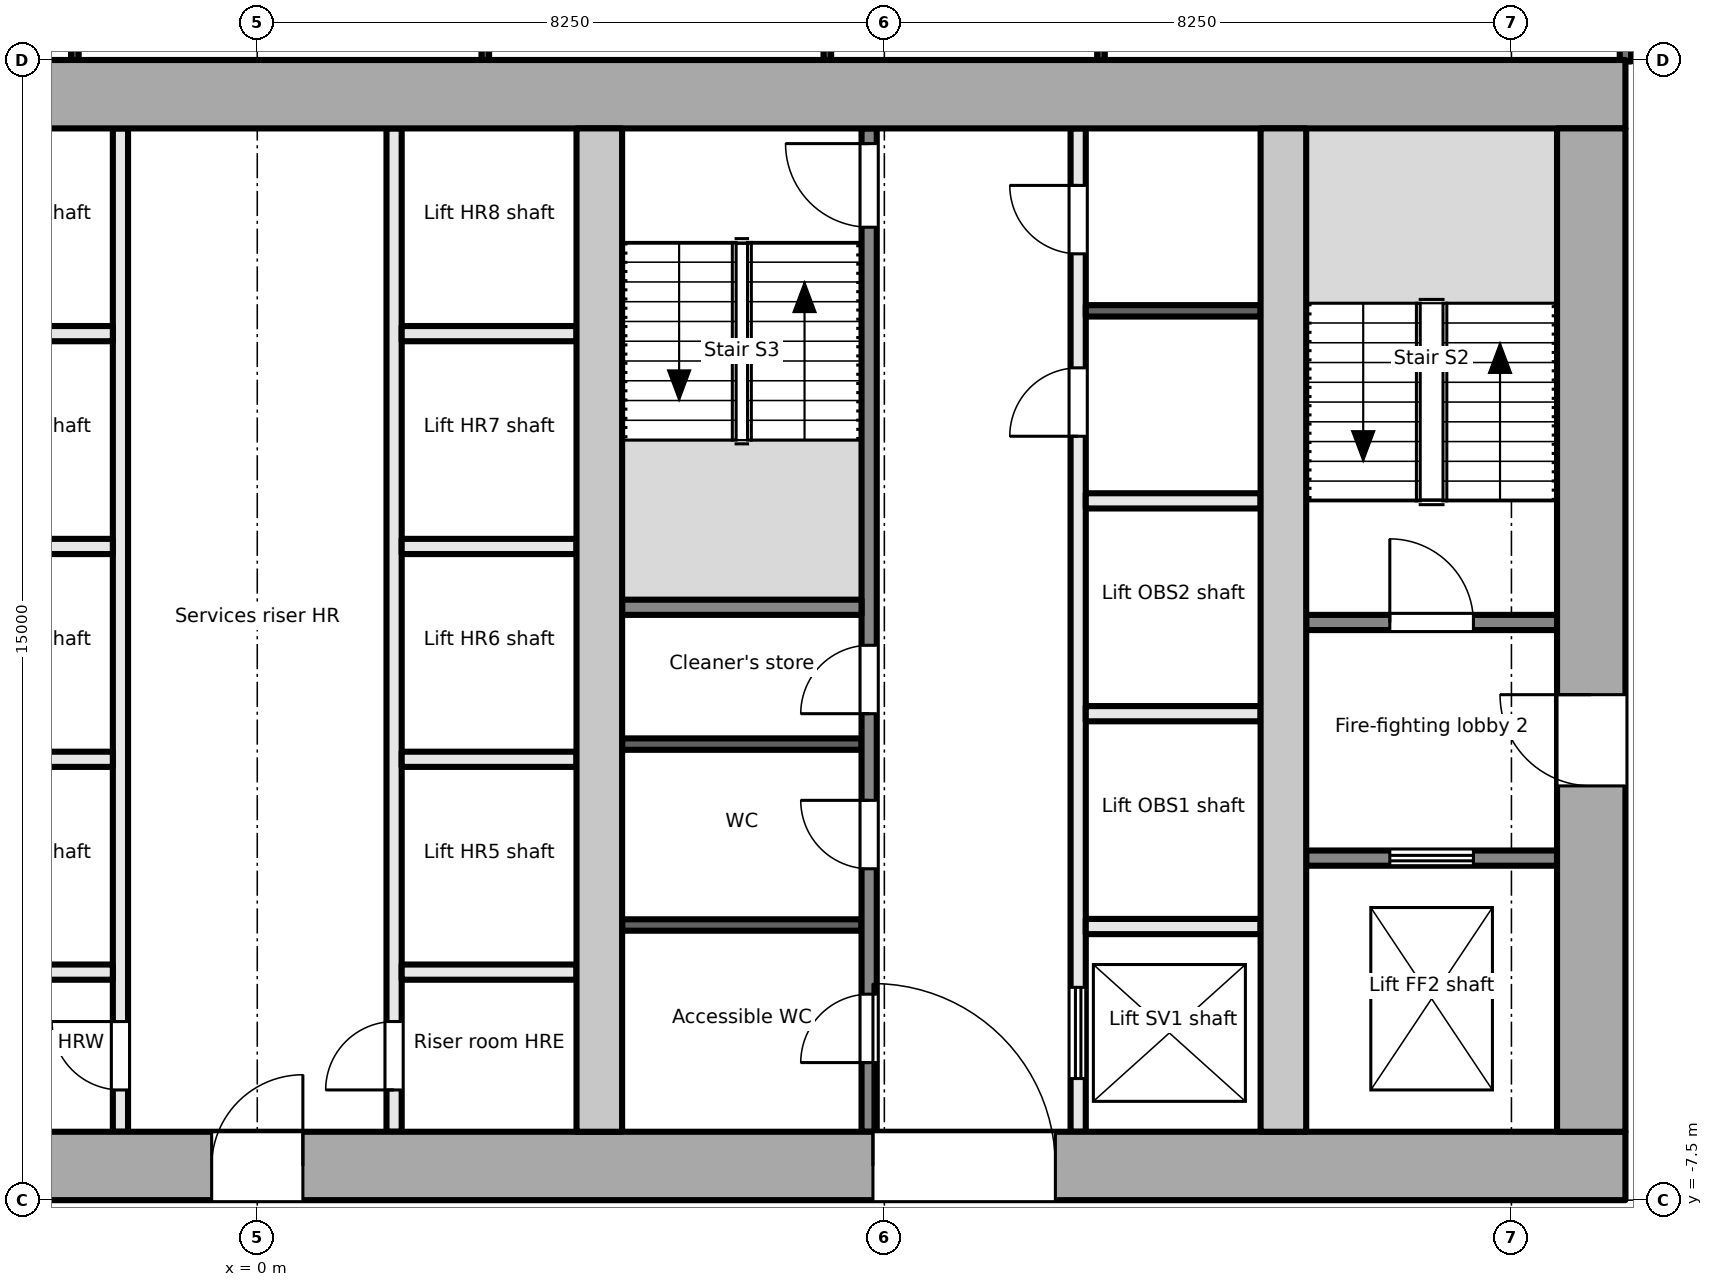
"""IFC4 building model, lengths in metres.
Left out: names, types, materials, properties, quantities, classifications, styles, units other than length and angle.
Written with IfcOpenShell. Run it as: python <this file> out.ifc"""

import sys

from ifc_helpers import new_model, si_unit, direction, frame, frame_2d, origin, place, context, subcontext, project, spatial, rectangle, extrude, element, fill, save


model = new_model("IFC4")
c1 = context("Model", 3, precision=1e-05, world=origin(), true_north=direction((0.0, 1.0)))
c2 = subcontext(c1, "Body", "Model", "MODEL_VIEW")
j1 = project(units=[si_unit("LENGTHUNIT", "METRE"), si_unit("PLANEANGLEUNIT", "RADIAN")], contexts=[c1])
p1 = place(None, origin())
s1 = spatial("IfcSite", under=j1, at=p1, CompositionType="ELEMENT")
p2 = place(p1, origin())
s2 = spatial("IfcBuilding", under=s1, at=p2, CompositionType="ELEMENT")
p3 = place(p2, frame((0.0, 0.0, 146.1)))
s3 = spatial("IfcBuildingStorey", under=s2, at=p3, CompositionType="ELEMENT", Elevation=146.1)
p4 = place(p3, frame((-18.0, -7.05, -0.2), z_axis=(0.0, 0.0, 1.0), x_axis=(1.0, 0.0, 0.0)))
e1 = element("IfcWall", 1, at=p4, inside=s3, PredefinedType="SHEAR", context=c2, shape_type="SweptSolid", body=[
    extrude(rectangle(XDim=36.0, YDim=0.9, at=frame_2d((18.0, 0.0))), origin(), (0.0, 0.0, 1.0), 4.0),
])
p5 = place(p4, frame((7.8, 0.0, 0.2)))
e2 = element("IfcOpeningElement", 2, at=p5, cuts=e1, PredefinedType="OPENING", context=c2, shape_type="SweptSolid", body=[
    extrude(rectangle(XDim=2.4, YDim=2.1, at=frame_2d((1.2, 1.05))), frame((0.0, 0.46, 0.0), z_axis=(0.0, -1.0, 0.0), x_axis=(1.0, 0.0, 0.0)), (0.0, 0.0, 1.0), 0.921),
])
p6 = place(p4, frame((17.4, 0.0, 0.2)))
e3 = element("IfcOpeningElement", 3, at=p6, cuts=e1, PredefinedType="OPENING", context=c2, shape_type="SweptSolid", body=[
    extrude(rectangle(XDim=1.2, YDim=2.1, at=frame_2d((0.6, 1.05))), frame((0.0, 0.46, 0.0), z_axis=(0.0, -1.0, 0.0), x_axis=(1.0, 0.0, 0.0)), (0.0, 0.0, 1.0), 0.921),
])
p7 = place(p4, frame((26.1, 0.0, 0.2)))
e4 = element("IfcOpeningElement", 4, at=p7, cuts=e1, PredefinedType="OPENING", context=c2, shape_type="SweptSolid", body=[
    extrude(rectangle(XDim=2.4, YDim=2.1, at=frame_2d((1.2, 1.05))), frame((0.0, 0.46, 0.0), z_axis=(0.0, -1.0, 0.0), x_axis=(1.0, 0.0, 0.0)), (0.0, 0.0, 1.0), 0.921),
])
p8 = place(p3, frame((-18.0, 7.05, -0.2), z_axis=(0.0, 0.0, 1.0), x_axis=(1.0, 0.0, 0.0)))
e5 = element("IfcWall", 5, at=p8, inside=s3, PredefinedType="SHEAR", context=c2, shape_type="SweptSolid", body=[
    extrude(rectangle(XDim=36.0, YDim=0.9, at=frame_2d((18.0, 0.0))), origin(), (0.0, 0.0, 1.0), 4.0),
])
p9 = place(p3, frame((17.55, -6.6, -0.2), z_axis=(0.0, 0.0, 1.0), x_axis=(0.0, 1.0, 0.0)))
e6 = element("IfcWall", 6, at=p9, inside=s3, PredefinedType="SHEAR", context=c2, shape_type="SweptSolid", body=[
    extrude(rectangle(XDim=13.2, YDim=0.9, at=frame_2d((6.6, 0.0))), origin(), (0.0, 0.0, 1.0), 4.0),
])
p10 = place(p9, frame((4.55, 0.0, 0.2)))
e7 = element("IfcOpeningElement", 7, at=p10, cuts=e6, PredefinedType="OPENING", context=c2, shape_type="SweptSolid", body=[
    extrude(rectangle(XDim=1.2, YDim=2.1, at=frame_2d((0.6, 1.05))), frame((0.0, 0.46, 0.0), z_axis=(0.0, -1.0, 0.0), x_axis=(1.0, 0.0, 0.0)), (0.0, 0.0, 1.0), 0.921),
])
for number, where, z_axis, x_axis in (
    (8, (4.5, -6.6, -0.2), (0.0, 0.0, 1.0), (0.0, 1.0, 0.0)),
    (9, (13.5, -6.6, -0.2), (0.0, 0.0, 1.0), (0.0, 1.0, 0.0)),
):
    element("IfcWall", number, at=place(p3, frame(where, z_axis=z_axis, x_axis=x_axis)), inside=s3, PredefinedType="SHEAR", context=c2, shape_type="SweptSolid", body=[
        extrude(rectangle(XDim=13.2, YDim=0.6, at=frame_2d((6.6, 0.0))), origin(), (0.0, 0.0, 1.0), 4.0),
    ])
p11 = place(p3, frame((13.8, -3.0, 0.0), z_axis=(0.0, 0.0, 1.0), x_axis=(1.0, 0.0, 0.0)))
e10 = element("IfcWall", 10, at=p11, inside=s3, PredefinedType="PARTITIONING", context=c2, shape_type="SweptSolid", body=[
    extrude(rectangle(XDim=3.3, YDim=0.2, at=frame_2d((1.65, 0.0))), origin(), (0.0, 0.0, 1.0), 3.8),
])
p12 = place(p11, frame((1.1, 0.0, 0.0)))
e11 = element("IfcOpeningElement", 11, at=p12, cuts=e10, PredefinedType="OPENING", context=c2, shape_type="SweptSolid", body=[
    extrude(rectangle(XDim=1.1, YDim=2.1, at=frame_2d((0.55, 1.05))), frame((0.0, 0.111, 0.0), z_axis=(0.0, -1.0, 0.0), x_axis=(1.0, 0.0, 0.0)), (0.0, 0.0, 1.0), 0.221),
])
p13 = place(p3, frame((13.8, 0.1, 0.0), z_axis=(0.0, 0.0, 1.0), x_axis=(1.0, 0.0, 0.0)))
e12 = element("IfcWall", 12, at=p13, inside=s3, PredefinedType="PARTITIONING", context=c2, shape_type="SweptSolid", body=[
    extrude(rectangle(XDim=3.3, YDim=0.2, at=frame_2d((1.65, 0.0))), origin(), (0.0, 0.0, 1.0), 3.8),
])
p14 = place(p13, frame((1.1, 0.0, 0.0)))
e13 = element("IfcOpeningElement", 13, at=p14, cuts=e12, PredefinedType="OPENING", context=c2, shape_type="SweptSolid", body=[
    extrude(rectangle(XDim=1.1, YDim=2.1, at=frame_2d((0.55, 1.05))), frame((0.0, 0.111, 0.0), z_axis=(0.0, -1.0, 0.0), x_axis=(1.0, 0.0, 0.0)), (0.0, 0.0, 1.0), 0.221),
])
p15 = place(p3, frame((-1.8, -6.6, 0.0), z_axis=(0.0, 0.0, 1.0), x_axis=(0.0, 1.0, 0.0)))
e14 = element("IfcWall", 14, at=p15, inside=s3, PredefinedType="PARTITIONING", context=c2, shape_type="SweptSolid", body=[
    extrude(rectangle(XDim=13.2, YDim=0.2, at=frame_2d((6.6, 0.0))), origin(), (0.0, 0.0, 1.0), 3.8),
])
p16 = place(p15, frame((0.55, 0.0, 0.0)))
e15 = element("IfcOpeningElement", 15, at=p16, cuts=e14, PredefinedType="OPENING", context=c2, shape_type="SweptSolid", body=[
    extrude(rectangle(XDim=0.9, YDim=2.1, at=frame_2d((0.45, 1.05))), frame((0.0, 0.111, 0.0), z_axis=(0.0, -1.0, 0.0), x_axis=(1.0, 0.0, 0.0)), (0.0, 0.0, 1.0), 0.221),
])
p17 = place(p3, frame((1.8, -6.6, 0.0), z_axis=(0.0, 0.0, 1.0), x_axis=(0.0, 1.0, 0.0)))
e16 = element("IfcWall", 16, at=p17, inside=s3, PredefinedType="PARTITIONING", context=c2, shape_type="SweptSolid", body=[
    extrude(rectangle(XDim=13.2, YDim=0.2, at=frame_2d((6.6, 0.0))), origin(), (0.0, 0.0, 1.0), 3.8),
])
p18 = place(p17, frame((0.55, 0.0, 0.0)))
e17 = element("IfcOpeningElement", 17, at=p18, cuts=e16, PredefinedType="OPENING", context=c2, shape_type="SweptSolid", body=[
    extrude(rectangle(XDim=0.9, YDim=2.1, at=frame_2d((0.45, 1.05))), frame((0.0, 0.111, 0.0), z_axis=(0.0, -1.0, 0.0), x_axis=(1.0, 0.0, 0.0)), (0.0, 0.0, 1.0), 0.221),
])
for number, where, z_axis, x_axis in (
    (18, (-4.2, -1.7, 0.0), (0.0, 0.0, 1.0), (1.0, 0.0, 0.0)),
    (19, (-4.2, 1.1, 0.0), (0.0, 0.0, 1.0), (1.0, 0.0, 0.0)),
    (20, (-4.2, 3.9, 0.0), (0.0, 0.0, 1.0), (1.0, 0.0, 0.0)),
    (21, (-4.2, -4.5, 0.0), (0.0, 0.0, 1.0), (1.0, 0.0, 0.0)),
    (22, (1.9, -1.7, 0.0), (0.0, 0.0, 1.0), (1.0, 0.0, 0.0)),
    (23, (1.9, 1.1, 0.0), (0.0, 0.0, 1.0), (1.0, 0.0, 0.0)),
    (24, (1.9, 3.9, 0.0), (0.0, 0.0, 1.0), (1.0, 0.0, 0.0)),
    (25, (1.9, -4.5, 0.0), (0.0, 0.0, 1.0), (1.0, 0.0, 0.0)),
):
    element("IfcWall", number, at=place(p3, frame(where, z_axis=z_axis, x_axis=x_axis)), inside=s3, PredefinedType="PARTITIONING", context=c2, shape_type="SweptSolid", body=[
        extrude(rectangle(XDim=2.3, YDim=0.2, at=frame_2d((1.15, 0.0))), origin(), (0.0, 0.0, 1.0), 3.8),
    ])
p19 = place(p3, frame((8.05, -6.6, 0.0), z_axis=(0.0, 0.0, 1.0), x_axis=(0.0, 1.0, 0.0)))
e26 = element("IfcWall", 26, at=p19, inside=s3, PredefinedType="PARTITIONING", context=c2, shape_type="SweptSolid", body=[
    extrude(rectangle(XDim=13.2, YDim=0.2, at=frame_2d((6.6, 0.0))), origin(), (0.0, 0.0, 1.0), 3.8),
])
p20 = place(p19, frame((0.91, 0.0, 0.0)))
e27 = element("IfcOpeningElement", 27, at=p20, cuts=e26, PredefinedType="OPENING", context=c2, shape_type="SweptSolid", body=[
    extrude(rectangle(XDim=0.9, YDim=2.1, at=frame_2d((0.45, 1.05))), frame((0.0, 0.111, 0.0), z_axis=(0.0, -1.0, 0.0), x_axis=(1.0, 0.0, 0.0)), (0.0, 0.0, 1.0), 0.221),
])
p21 = place(p19, frame((3.46, 0.0, 0.0)))
e28 = element("IfcOpeningElement", 28, at=p21, cuts=e26, PredefinedType="OPENING", context=c2, shape_type="SweptSolid", body=[
    extrude(rectangle(XDim=0.9, YDim=2.1, at=frame_2d((0.45, 1.05))), frame((0.0, 0.111, 0.0), z_axis=(0.0, -1.0, 0.0), x_axis=(1.0, 0.0, 0.0)), (0.0, 0.0, 1.0), 0.221),
])
p22 = place(p19, frame((5.5, 0.0, 0.0)))
e29 = element("IfcOpeningElement", 29, at=p22, cuts=e26, PredefinedType="OPENING", context=c2, shape_type="SweptSolid", body=[
    extrude(rectangle(XDim=0.9, YDim=2.1, at=frame_2d((0.45, 1.05))), frame((0.0, 0.111, 0.0), z_axis=(0.0, -1.0, 0.0), x_axis=(1.0, 0.0, 0.0)), (0.0, 0.0, 1.0), 0.221),
])
p23 = place(p19, frame((11.9, 0.0, 0.0)))
e30 = element("IfcOpeningElement", 30, at=p23, cuts=e26, PredefinedType="OPENING", context=c2, shape_type="SweptSolid", body=[
    extrude(rectangle(XDim=1.1, YDim=2.1, at=frame_2d((0.55, 1.05))), frame((0.0, 0.111, 0.0), z_axis=(0.0, -1.0, 0.0), x_axis=(1.0, 0.0, 0.0)), (0.0, 0.0, 1.0), 0.221),
])
p24 = place(p3, frame((10.8, -6.6, 0.0), z_axis=(0.0, 0.0, 1.0), x_axis=(0.0, 1.0, 0.0)))
e31 = element("IfcWall", 31, at=p24, inside=s3, PredefinedType="PARTITIONING", context=c2, shape_type="SweptSolid", body=[
    extrude(rectangle(XDim=13.2, YDim=0.2, at=frame_2d((6.6, 0.0))), origin(), (0.0, 0.0, 1.0), 3.8),
])
p25 = place(p24, frame((0.7, 0.0, 0.0)))
e32 = element("IfcOpeningElement", 32, at=p25, cuts=e31, PredefinedType="OPENING", context=c2, shape_type="SweptSolid", body=[
    extrude(rectangle(XDim=1.2, YDim=2.1, at=frame_2d((0.6, 1.05))), frame((0.0, 0.111, 0.0), z_axis=(0.0, -1.0, 0.0), x_axis=(1.0, 0.0, 0.0)), (0.0, 0.0, 1.0), 0.221),
])
p26 = place(p24, frame((9.15, 0.0, 0.0)))
e33 = element("IfcOpeningElement", 33, at=p26, cuts=e31, PredefinedType="OPENING", context=c2, shape_type="SweptSolid", body=[
    extrude(rectangle(XDim=0.9, YDim=2.1, at=frame_2d((0.45, 1.05))), frame((0.0, 0.111, 0.0), z_axis=(0.0, -1.0, 0.0), x_axis=(1.0, 0.0, 0.0)), (0.0, 0.0, 1.0), 0.221),
])
p27 = place(p24, frame((11.55, 0.0, 0.0)))
e34 = element("IfcOpeningElement", 34, at=p27, cuts=e31, PredefinedType="OPENING", context=c2, shape_type="SweptSolid", body=[
    extrude(rectangle(XDim=0.9, YDim=2.1, at=frame_2d((0.45, 1.05))), frame((0.0, 0.111, 0.0), z_axis=(0.0, -1.0, 0.0), x_axis=(1.0, 0.0, 0.0)), (0.0, 0.0, 1.0), 0.221),
])
p28 = place(p3, frame((4.8, 0.3, 0.0), z_axis=(0.0, 0.0, 1.0), x_axis=(1.0, 0.0, 0.0)))
e35 = element("IfcWall", 35, at=p28, inside=s3, PredefinedType="PARTITIONING", context=c2, shape_type="SweptSolid", body=[
    extrude(rectangle(XDim=3.15, YDim=0.2, at=frame_2d((1.575, 0.0))), origin(), (0.0, 0.0, 1.0), 3.8),
])
for number, where, z_axis, x_axis in (
    (36, (4.8, -3.88, 0.0), (0.0, 0.0, 1.0), (1.0, 0.0, 0.0)),
    (37, (4.8, -1.5, 0.0), (0.0, 0.0, 1.0), (1.0, 0.0, 0.0)),
):
    element("IfcWall", number, at=place(p3, frame(where, z_axis=z_axis, x_axis=x_axis)), inside=s3, PredefinedType="PARTITIONING", context=c2, shape_type="SweptSolid", body=[
        extrude(rectangle(XDim=3.15, YDim=0.15, at=frame_2d((1.575, 0.0))), origin(), (0.0, 0.0, 1.0), 3.8),
    ])
for number, where, z_axis, x_axis in (
    (38, (10.9, -3.9, 0.0), (0.0, 0.0, 1.0), (1.0, 0.0, 0.0)),
    (39, (10.9, -1.1, 0.0), (0.0, 0.0, 1.0), (1.0, 0.0, 0.0)),
    (40, (10.9, 1.7, 0.0), (0.0, 0.0, 1.0), (1.0, 0.0, 0.0)),
):
    element("IfcWall", number, at=place(p3, frame(where, z_axis=z_axis, x_axis=x_axis)), inside=s3, PredefinedType="PARTITIONING", context=c2, shape_type="SweptSolid", body=[
        extrude(rectangle(XDim=2.3, YDim=0.2, at=frame_2d((1.15, 0.0))), origin(), (0.0, 0.0, 1.0), 3.8),
    ])
p29 = place(p3, frame((10.9, 4.2, 0.0), z_axis=(0.0, 0.0, 1.0), x_axis=(1.0, 0.0, 0.0)))
e41 = element("IfcWall", 41, at=p29, inside=s3, PredefinedType="PARTITIONING", context=c2, shape_type="SweptSolid", body=[
    extrude(rectangle(XDim=2.3, YDim=0.15, at=frame_2d((1.15, 0.0))), origin(), (0.0, 0.0, 1.0), 3.8),
])
p30 = place(p3, frame((18.0, 7.48, 0.0), z_axis=(0.0, 0.0, 1.0), x_axis=(0.0, 1.0, 0.0)))
e42 = element("IfcWall", 42, at=p30, inside=s3, PredefinedType="PARTITIONING", context=c2, shape_type="SweptSolid", body=[
    extrude(rectangle(XDim=4.76, YDim=0.15, at=frame_2d((2.38, 0.0))), origin(), (0.0, 0.0, 1.0), 3.8),
])
p31 = place(p30, frame((1.93, 0.0, 0.0)))
e43 = element("IfcOpeningElement", 43, at=p31, cuts=e42, PredefinedType="OPENING", context=c2, shape_type="SweptSolid", body=[
    extrude(rectangle(XDim=0.9, YDim=2.1, at=frame_2d((0.45, 1.05))), frame((0.0, 0.085, 0.0), z_axis=(0.0, -1.0, 0.0), x_axis=(1.0, 0.0, 0.0)), (0.0, 0.0, 1.0), 0.171),
])
p32 = place(p3, frame((3.0, 7.5, 0.0), z_axis=(0.0, 0.0, 1.0), x_axis=(0.0, 1.0, 0.0)))
e44 = element("IfcWall", 44, at=p32, inside=s3, PredefinedType="PARTITIONING", context=c2, shape_type="SweptSolid", body=[
    extrude(rectangle(XDim=2.95, YDim=0.1, at=frame_2d((1.475, 0.0))), origin(), (0.0, 0.0, 1.0), 3.8),
])
p33 = place(p32, frame((0.575, 0.0, 0.9)))
e45 = element("IfcOpeningElement", 45, at=p33, cuts=e44, PredefinedType="OPENING", context=c2, shape_type="SweptSolid", body=[
    extrude(rectangle(XDim=1.8, YDim=1.2, at=frame_2d((0.9, 0.6))), frame((0.0, 0.061, 0.0), z_axis=(0.0, -1.0, 0.0), x_axis=(1.0, 0.0, 0.0)), (0.0, 0.0, 1.0), 0.121),
])
for number, where, z_axis, x_axis in (
    (46, (7.5, 10.45, 0.0), (0.0, 0.0, 1.0), (0.0, -1.0, 0.0)),
    (47, (11.1, 7.5, 0.0), (0.0, 0.0, 1.0), (0.0, 1.0, 0.0)),
    (48, (-2.4, 10.45, 0.0), (0.0, 0.0, 1.0), (0.0, -1.0, 0.0)),
):
    element("IfcWall", number, at=place(p3, frame(where, z_axis=z_axis, x_axis=x_axis)), inside=s3, PredefinedType="PARTITIONING", context=c2, shape_type="SweptSolid", body=[
        extrude(rectangle(XDim=2.95, YDim=0.1, at=frame_2d((1.475, 0.0))), origin(), (0.0, 0.0, 1.0), 3.8),
    ])
p34 = place(p12, origin())
e49 = element("IfcDoor", 49, at=p34, inside=s3, OperationType="DOUBLE_DOOR_SLIDING", PredefinedType="DOOR", context=c2, shape_type="SweptSolid", body=[
    extrude(rectangle(XDim=1.1, YDim=2.1, at=frame_2d((0.55, 1.05))), frame((0.0, 0.025, 0.0), z_axis=(0.0, -1.0, 0.0), x_axis=(1.0, 0.0, 0.0)), (0.0, 0.0, 1.0), 0.05),
])
fill(e11, e49)
p35 = place(p10, origin())
e50 = element("IfcDoor", 50, at=p35, inside=s3, OperationType="SINGLE_SWING_RIGHT", PredefinedType="DOOR", context=c2, shape_type="SweptSolid", body=[
    extrude(rectangle(XDim=1.2, YDim=2.1, at=frame_2d((0.6, 1.05))), frame((0.0, 0.025, 0.0), z_axis=(0.0, -1.0, 0.0), x_axis=(1.0, 0.0, 0.0)), (0.0, 0.0, 1.0), 0.05),
])
fill(e7, e50)
p36 = place(p14, origin())
e51 = element("IfcDoor", 51, at=p36, inside=s3, OperationType="SINGLE_SWING_LEFT", PredefinedType="DOOR", context=c2, shape_type="SweptSolid", body=[
    extrude(rectangle(XDim=1.1, YDim=2.1, at=frame_2d((0.55, 1.05))), frame((0.0, 0.025, 0.0), z_axis=(0.0, -1.0, 0.0), x_axis=(1.0, 0.0, 0.0)), (0.0, 0.0, 1.0), 0.05),
])
fill(e13, e51)
p37 = place(p16, origin())
e52 = element("IfcDoor", 52, at=p37, inside=s3, OperationType="SINGLE_SWING_RIGHT", PredefinedType="DOOR", context=c2, shape_type="SweptSolid", body=[
    extrude(rectangle(XDim=0.9, YDim=2.1, at=frame_2d((0.45, 1.05))), frame((0.0, 0.025, 0.0), z_axis=(0.0, -1.0, 0.0), x_axis=(1.0, 0.0, 0.0)), (0.0, 0.0, 1.0), 0.05),
])
fill(e15, e52)
p38 = place(p18, origin())
e53 = element("IfcDoor", 53, at=p38, inside=s3, OperationType="SINGLE_SWING_LEFT", PredefinedType="DOOR", context=c2, shape_type="SweptSolid", body=[
    extrude(rectangle(XDim=0.9, YDim=2.1, at=frame_2d((0.45, 1.05))), frame((0.0, 0.025, 0.0), z_axis=(0.0, -1.0, 0.0), x_axis=(1.0, 0.0, 0.0)), (0.0, 0.0, 1.0), 0.05),
])
fill(e17, e53)
p39 = place(p6, origin())
e54 = element("IfcDoor", 54, at=p39, inside=s3, OperationType="SINGLE_SWING_RIGHT", PredefinedType="DOOR", context=c2, shape_type="SweptSolid", body=[
    extrude(rectangle(XDim=1.2, YDim=2.1, at=frame_2d((0.6, 1.05))), frame((0.0, 0.025, 0.0), z_axis=(0.0, -1.0, 0.0), x_axis=(1.0, 0.0, 0.0)), (0.0, 0.0, 1.0), 0.05),
])
fill(e3, e54)
p40 = place(p20, origin())
e55 = element("IfcDoor", 55, at=p40, inside=s3, OperationType="SINGLE_SWING_LEFT", PredefinedType="DOOR", context=c2, shape_type="SweptSolid", body=[
    extrude(rectangle(XDim=0.9, YDim=2.1, at=frame_2d((0.45, 1.05))), frame((0.0, 0.025, 0.0), z_axis=(0.0, -1.0, 0.0), x_axis=(1.0, 0.0, 0.0)), (0.0, 0.0, 1.0), 0.05),
])
fill(e27, e55)
p41 = place(p21, origin())
e56 = element("IfcDoor", 56, at=p41, inside=s3, OperationType="SINGLE_SWING_RIGHT", PredefinedType="DOOR", context=c2, shape_type="SweptSolid", body=[
    extrude(rectangle(XDim=0.9, YDim=2.1, at=frame_2d((0.45, 1.05))), frame((0.0, 0.025, 0.0), z_axis=(0.0, -1.0, 0.0), x_axis=(1.0, 0.0, 0.0)), (0.0, 0.0, 1.0), 0.05),
])
fill(e28, e56)
p42 = place(p22, origin())
e57 = element("IfcDoor", 57, at=p42, inside=s3, OperationType="SINGLE_SWING_LEFT", PredefinedType="DOOR", context=c2, shape_type="SweptSolid", body=[
    extrude(rectangle(XDim=0.9, YDim=2.1, at=frame_2d((0.45, 1.05))), frame((0.0, 0.025, 0.0), z_axis=(0.0, -1.0, 0.0), x_axis=(1.0, 0.0, 0.0)), (0.0, 0.0, 1.0), 0.05),
])
fill(e29, e57)
p43 = place(p23, origin())
e58 = element("IfcDoor", 58, at=p43, inside=s3, OperationType="SINGLE_SWING_RIGHT", PredefinedType="DOOR", context=c2, shape_type="SweptSolid", body=[
    extrude(rectangle(XDim=1.1, YDim=2.1, at=frame_2d((0.55, 1.05))), frame((0.0, 0.025, 0.0), z_axis=(0.0, -1.0, 0.0), x_axis=(1.0, 0.0, 0.0)), (0.0, 0.0, 1.0), 0.05),
])
fill(e30, e58)
p44 = place(p7, origin())
e59 = element("IfcDoor", 59, at=p44, inside=s3, OperationType="DOUBLE_DOOR_DOUBLE_SWING", PredefinedType="DOOR", context=c2, shape_type="SweptSolid", body=[
    extrude(rectangle(XDim=2.4, YDim=2.1, at=frame_2d((1.2, 1.05))), frame((0.0, 0.025, 0.0), z_axis=(0.0, -1.0, 0.0), x_axis=(1.0, 0.0, 0.0)), (0.0, 0.0, 1.0), 0.05),
])
fill(e4, e59)
p45 = place(p25, origin())
e60 = element("IfcDoor", 60, at=p45, inside=s3, OperationType="DOUBLE_DOOR_SLIDING", PredefinedType="DOOR", context=c2, shape_type="SweptSolid", body=[
    extrude(rectangle(XDim=1.2, YDim=2.1, at=frame_2d((0.6, 1.05))), frame((0.0, 0.025, 0.0), z_axis=(0.0, -1.0, 0.0), x_axis=(1.0, 0.0, 0.0)), (0.0, 0.0, 1.0), 0.05),
])
fill(e32, e60)
p46 = place(p26, origin())
e61 = element("IfcDoor", 61, at=p46, inside=s3, OperationType="SINGLE_SWING_LEFT", PredefinedType="DOOR", context=c2, shape_type="SweptSolid", body=[
    extrude(rectangle(XDim=0.9, YDim=2.1, at=frame_2d((0.45, 1.05))), frame((0.0, 0.025, 0.0), z_axis=(0.0, -1.0, 0.0), x_axis=(1.0, 0.0, 0.0)), (0.0, 0.0, 1.0), 0.05),
])
fill(e33, e61)
p47 = place(p27, origin())
e62 = element("IfcDoor", 62, at=p47, inside=s3, OperationType="SINGLE_SWING_RIGHT", PredefinedType="DOOR", context=c2, shape_type="SweptSolid", body=[
    extrude(rectangle(XDim=0.9, YDim=2.1, at=frame_2d((0.45, 1.05))), frame((0.0, 0.025, 0.0), z_axis=(0.0, -1.0, 0.0), x_axis=(1.0, 0.0, 0.0)), (0.0, 0.0, 1.0), 0.05),
])
fill(e34, e62)
save(model, sys.argv[1])
